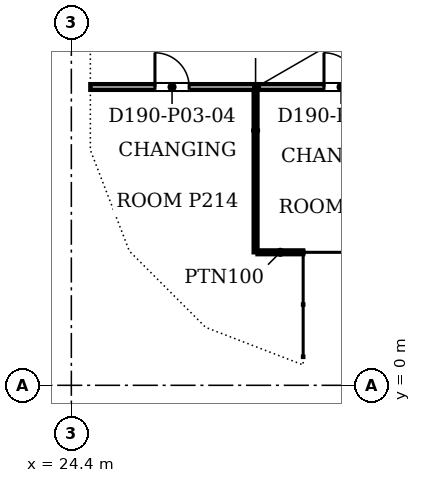
"""IFC4 building model, lengths in metres.
Left out: names, types, materials, properties, quantities, classifications, styles, units other than length and angle.
Written with IfcOpenShell. Run it as: python <this file> out.ifc"""

import sys

from ifc_helpers import new_model, si_unit, direction, frame, frame_2d, origin, place, context, subcontext, project, spatial, polyline, rectangle, outline, extrude, faceted_brep, source, transform, mapped, element, fill, save


model = new_model("IFC4")
c1 = context("Model", 3, precision=1e-05, world=origin(), true_north=direction((0.0, 1.0)))
c2 = subcontext(c1, "Body", "Model", "MODEL_VIEW")
j1 = project(units=[si_unit("LENGTHUNIT", "METRE"), si_unit("PLANEANGLEUNIT", "RADIAN")], contexts=[c1])
p1 = place(None, origin())
s1 = spatial("IfcSite", under=j1, at=p1, CompositionType="ELEMENT")
p2 = place(p1, origin())
s2 = spatial("IfcBuilding", under=s1, at=p2, CompositionType="ELEMENT")
p3 = place(p2, frame((0.0, 0.0, 12.0)))
s3 = spatial("IfcBuildingStorey", under=s2, at=p3, CompositionType="ELEMENT", Elevation=12.0)
m1 = source(origin(), c2, "Body", "Brep", [
    faceted_brep([(0.047, -0.25, 0.0), (6.1, -0.25, 8.4), (0.0, -0.25, 8.4), (0.0, -0.25, 0.066), (0.093, 0.25, 8.4), (6.1, 0.25, 8.4), (0.093, 0.25, 0.065), (0.047, 0.0, 0.0)], [[[0, 1, 2, 3]], [[4, 5, 6]], [[6, 5, 1, 0, 7]], [[5, 4, 2, 1]], [[7, 0, 3]], [[6, 7, 3, 2, 4]]]),
])
p4 = place(p3, frame((30.5, 0.25, -3.6), z_axis=(0.0, 0.0, 1.0), x_axis=(1.0, 0.0, 0.0)))
e1 = element("IfcWall", 1, at=p4, inside=s3, PredefinedType="SOLIDWALL", context=c2, shape_type="MappedRepresentation", body=[
    mapped(m1, transform((0.0, 0.0, 0.0), scale=1.0)),
])
m2 = source(origin(), c2, "Body", "SweptSolid", [
    extrude(outline(polyline([(0.247, 0.705), (5.612, 8.15), (0.247, 8.15), (0.247, 0.705)])), frame((0.0, 0.26, 0.0), z_axis=(0.0, -1.0, 0.0), x_axis=(1.0, 0.0, 0.0)), (0.0, 0.0, 1.0), 0.52),
])
p5 = place(p4, origin())
e2 = element("IfcOpeningElement", 2, at=p5, cuts=e1, PredefinedType="OPENING", context=c2, shape_type="MappedRepresentation", body=[
    mapped(m2, transform((0.0, 0.0, 0.0), scale=1.0)),
])
m3 = source(origin(), c2, "Body", "Brep", [
    faceted_brep([(6.053, -0.25, 8.4), (0.0, -0.25, 0.0), (0.613, -0.25, 0.0), (6.053, -0.25, 7.549), (6.053, 0.25, 7.549), (0.613, 0.25, 0.0), (0.047, 0.25, 0.0), (0.047, 0.25, 0.065), (6.053, 0.25, 8.4), (0.0, 0.0, 0.0)], [[[0, 1, 2, 3]], [[4, 5, 6, 7, 8]], [[8, 7, 9, 1, 0]], [[6, 5, 2, 1, 9]], [[5, 4, 3, 2]], [[6, 9, 7]], [[3, 4, 8, 0]]]),
])
p6 = place(p3, frame((30.547, 0.25, -3.6), z_axis=(0.0, 0.0, 1.0), x_axis=(1.0, 0.0, 0.0)))
e3 = element("IfcWall", 3, at=p6, inside=s3, PredefinedType="SOLIDWALL", context=c2, shape_type="MappedRepresentation", body=[
    mapped(m3, transform((0.0, 0.0, 0.0), scale=1.0)),
])
p7 = place(p3, frame((29.248, 3.5, 0.0), z_axis=(0.0, 0.0, 1.0), x_axis=(0.0, 1.0, 0.0)))
e4 = element("IfcWall", 4, at=p7, inside=s3, PredefinedType="PARTITIONING", context=c2, shape_type="SweptSolid", body=[
    extrude(rectangle(XDim=4.274, YDim=0.1, at=frame_2d((2.137, 0.0))), origin(), (0.0, 0.0, 1.0), 3.672),
])
p8 = place(p3, frame((29.299, 3.5, 0.0), z_axis=(0.0, 0.0, 1.0), x_axis=(1.0, 0.0, 0.0)))
e5 = element("IfcWall", 5, at=p8, inside=s3, PredefinedType="PARTITIONING", context=c2, shape_type="SweptSolid", body=[
    extrude(rectangle(XDim=1.201, YDim=0.1, at=frame_2d((0.601, 0.0))), origin(), (0.0, 0.0, 1.0), 3.672),
])
p9 = place(p3, frame((33.824, 7.85, 0.0), z_axis=(0.0, 0.0, 1.0), x_axis=(-1.0, 0.0, 0.0)))
e6 = element("IfcWall", 6, at=p9, inside=s3, PredefinedType="PARTITIONING", context=c2, shape_type="SweptSolid", body=[
    extrude(rectangle(XDim=8.924, YDim=0.15, at=frame_2d((4.462, 0.0))), origin(), (0.0, 0.0, 1.0), 3.672),
])
m4 = source(origin(), c2, "Body", "SweptSolid", [
    extrude(rectangle(XDim=0.9, YDim=2.1, at=frame_2d((0.45, 1.05))), frame((0.0, 0.085, 0.0), z_axis=(0.0, -1.0, 0.0), x_axis=(1.0, 0.0, 0.0)), (0.0, 0.0, 1.0), 0.17),
])
p10 = place(p9, frame((6.324, 0.0, 0.0)))
e7 = element("IfcOpeningElement", 7, at=p10, cuts=e6, PredefinedType="OPENING", context=c2, shape_type="MappedRepresentation", body=[
    mapped(m4, transform((0.0, 0.0, 0.0), scale=1.0)),
])
p11 = place(p9, frame((1.876, 0.0, 0.0)))
e8 = element("IfcOpeningElement", 8, at=p11, cuts=e6, PredefinedType="OPENING", context=c2, shape_type="MappedRepresentation", body=[
    mapped(m4, transform((0.0, 0.0, 0.0), scale=1.0)),
])
m5 = source(origin(), c2, "Body", "SweptSolid", [
    extrude(rectangle(XDim=0.9, YDim=2.1, at=frame_2d((0.45, 1.05))), frame((0.0, 0.025, 0.0), z_axis=(0.0, -1.0, 0.0), x_axis=(1.0, 0.0, 0.0)), (0.0, 0.0, 1.0), 0.05),
])
p12 = place(p10, origin())
e9 = element("IfcDoor", 9, at=p12, inside=s3, OperationType="SINGLE_SWING_RIGHT", PredefinedType="DOOR", context=c2, shape_type="MappedRepresentation", body=[
    mapped(m5, transform((0.0, 0.0, 0.0), scale=1.0)),
])
fill(e7, e9)
p13 = place(p11, origin())
e10 = element("IfcDoor", 10, at=p13, inside=s3, OperationType="SINGLE_SWING_RIGHT", PredefinedType="DOOR", context=c2, shape_type="MappedRepresentation", body=[
    mapped(m5, transform((0.0, 0.0, 0.0), scale=1.0)),
])
fill(e8, e10)
save(model, sys.argv[1])
